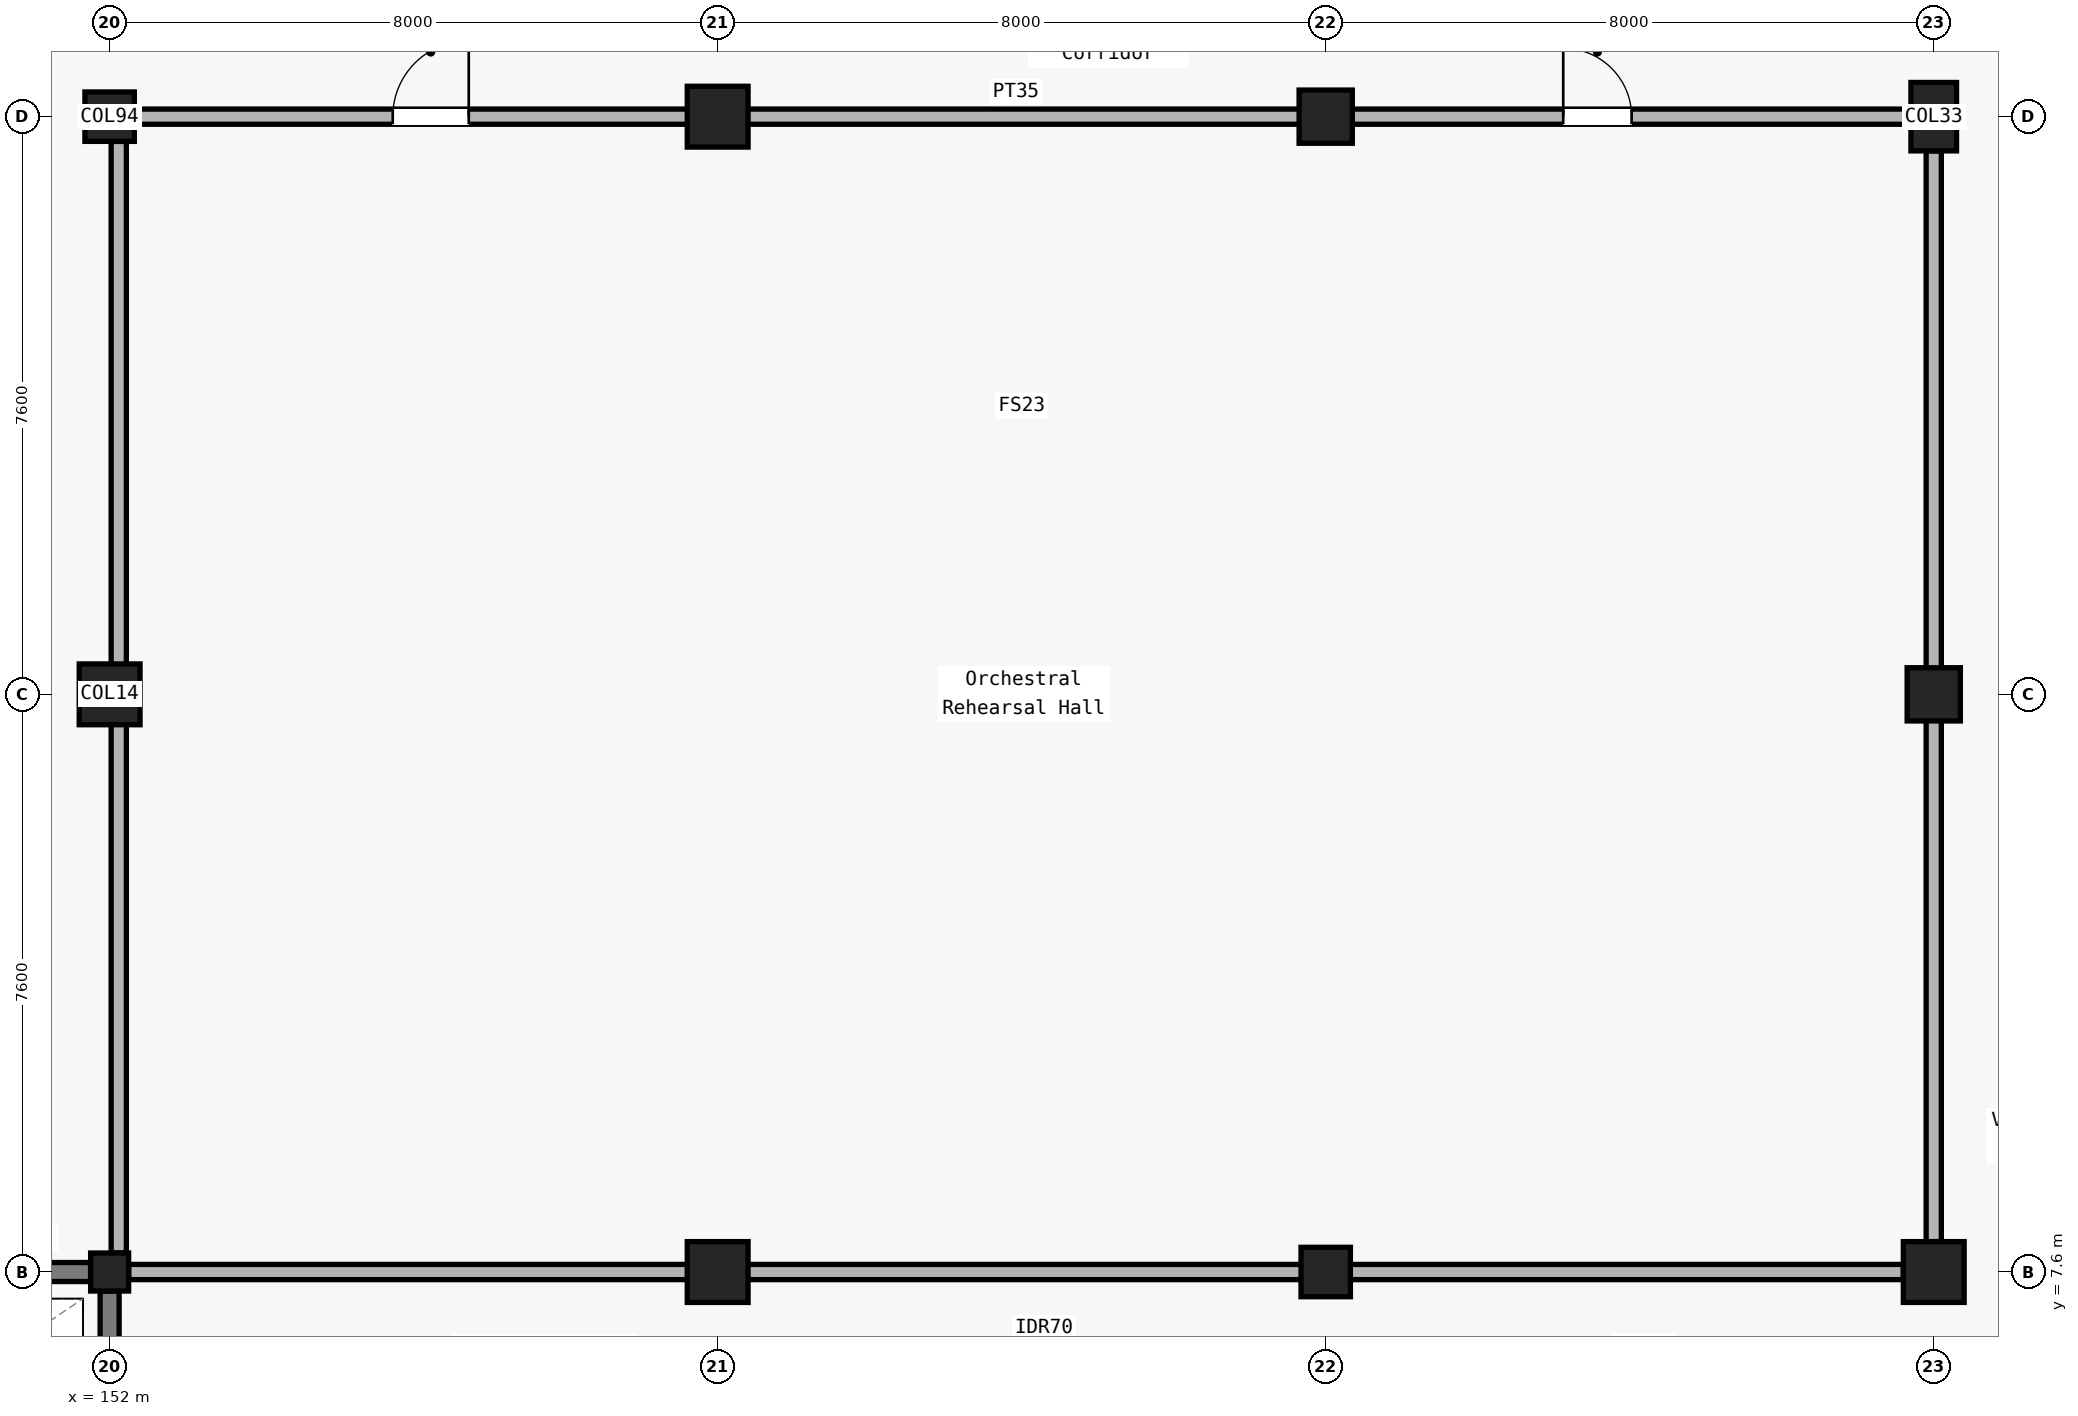
"""IFC4 building model, lengths in metres.
Left out: names, types, materials, properties, quantities, classifications, styles, units other than length and angle.
Written with IfcOpenShell. Run it as: python <this file> out.ifc"""

import sys

from ifc_helpers import new_model, si_unit, direction, frame, frame_2d, origin, origin_2d, place, context, subcontext, project, spatial, rectangle, circle, extrude, element, fill, save


model = new_model("IFC4")
c1 = context("Model", 3, precision=1e-05, world=origin(), true_north=direction((0.0, 1.0)))
c2 = subcontext(c1, "Body", "Model", "MODEL_VIEW")
j1 = project(units=[si_unit("LENGTHUNIT", "METRE"), si_unit("PLANEANGLEUNIT", "RADIAN")], contexts=[c1])
p1 = place(None, origin())
s1 = spatial("IfcSite", under=j1, at=p1, CompositionType="ELEMENT")
p2 = place(p1, origin())
s2 = spatial("IfcBuilding", under=s1, at=p2, CompositionType="ELEMENT")
p3 = place(p2, frame((0.0, 0.0, 10.2)))
s3 = spatial("IfcBuildingStorey", under=s2, at=p3, CompositionType="ELEMENT", Elevation=10.2)
p4 = place(p3, frame((152.0, 7.6, 0.0), z_axis=(0.0, 0.0, 1.0), x_axis=(1.0, 0.0, 0.0)))
e1 = element("IfcColumn", 1, at=p4, inside=s3, PredefinedType="COLUMN", context=c2, shape_type="SweptSolid", body=[
    extrude(rectangle(XDim=0.5, YDim=0.5, at=origin_2d()), origin(), (0.0, 0.0, 1.0), 4.8),
])
p5 = place(p3, frame((152.0, 15.2, 0.0), z_axis=(0.0, 0.0, 1.0), x_axis=(1.0, 0.0, 0.0)))
e2 = element("IfcColumn", 2, at=p5, inside=s3, PredefinedType="COLUMN", context=c2, shape_type="SweptSolid", body=[
    extrude(circle(Radius=0.4, at=origin_2d()), origin(), (0.0, 0.0, 1.0), 4.8),
])
p6 = place(p3, frame((152.0, 22.8, 0.0), z_axis=(0.0, 0.0, 1.0), x_axis=(1.0, 0.0, 0.0)))
e3 = element("IfcColumn", 3, at=p6, inside=s3, PredefinedType="COLUMN", context=c2, shape_type="SweptSolid", body=[
    extrude(circle(Radius=0.325, at=origin_2d()), origin(), (0.0, 0.0, 1.0), 4.8),
])
p7 = place(p3, frame((160.0, 7.6, 0.0), z_axis=(0.0, 0.0, 1.0), x_axis=(1.0, 0.0, 0.0)))
e4 = element("IfcColumn", 4, at=p7, inside=s3, PredefinedType="COLUMN", context=c2, shape_type="SweptSolid", body=[
    extrude(circle(Radius=0.4, at=origin_2d()), origin(), (0.0, 0.0, 1.0), 4.8),
])
p8 = place(p3, frame((160.0, 22.8, 0.0), z_axis=(0.0, 0.0, 1.0), x_axis=(1.0, 0.0, 0.0)))
e5 = element("IfcColumn", 5, at=p8, inside=s3, PredefinedType="COLUMN", context=c2, shape_type="SweptSolid", body=[
    extrude(rectangle(XDim=0.8, YDim=0.8, at=origin_2d()), origin(), (0.0, 0.0, 1.0), 4.8),
])
p9 = place(p3, frame((168.0, 7.6, 0.0), z_axis=(0.0, 0.0, 1.0), x_axis=(1.0, 0.0, 0.0)))
e6 = element("IfcColumn", 6, at=p9, inside=s3, PredefinedType="COLUMN", context=c2, shape_type="SweptSolid", body=[
    extrude(circle(Radius=0.325, at=origin_2d()), origin(), (0.0, 0.0, 1.0), 4.8),
])
p10 = place(p3, frame((168.0, 22.8, 0.0), z_axis=(0.0, 0.0, 1.0), x_axis=(1.0, 0.0, 0.0)))
e7 = element("IfcColumn", 7, at=p10, inside=s3, PredefinedType="COLUMN", context=c2, shape_type="SweptSolid", body=[
    extrude(rectangle(XDim=0.7, YDim=0.7, at=origin_2d()), origin(), (0.0, 0.0, 1.0), 4.8),
])
p11 = place(p3, frame((176.0, 7.6, 0.0), z_axis=(0.0, 0.0, 1.0), x_axis=(1.0, 0.0, 0.0)))
e8 = element("IfcColumn", 8, at=p11, inside=s3, PredefinedType="COLUMN", context=c2, shape_type="SweptSolid", body=[
    extrude(rectangle(XDim=0.8, YDim=0.8, at=origin_2d()), origin(), (0.0, 0.0, 1.0), 4.8),
])
p12 = place(p3, frame((176.0, 15.2, 0.0), z_axis=(0.0, 0.0, 1.0), x_axis=(1.0, 0.0, 0.0)))
e9 = element("IfcColumn", 9, at=p12, inside=s3, PredefinedType="COLUMN", context=c2, shape_type="SweptSolid", body=[
    extrude(rectangle(XDim=0.7, YDim=0.7, at=origin_2d()), origin(), (0.0, 0.0, 1.0), 4.8),
])
p13 = place(p3, frame((176.0, 22.8, 0.0), z_axis=(0.0, 0.0, 1.0), x_axis=(1.0, 0.0, 0.0)))
e10 = element("IfcColumn", 10, at=p13, inside=s3, PredefinedType="COLUMN", context=c2, shape_type="SweptSolid", body=[
    extrude(rectangle(XDim=0.6, YDim=0.9, at=origin_2d()), origin(), (0.0, 0.0, 1.0), 4.8),
])
p14 = place(p3, frame((144.15, 7.6, 0.0), z_axis=(0.0, 0.0, 1.0), x_axis=(1.0, 0.0, 0.0)))
e11 = element("IfcWall", 11, at=p14, inside=s3, PredefinedType="SOLIDWALL", context=c2, shape_type="SweptSolid", body=[
    extrude(rectangle(XDim=7.6, YDim=0.25, at=frame_2d((3.8, 0.0))), origin(), (0.0, 0.0, 1.0), 3.655),
])
p15 = place(p3, frame((152.0, 0.195, 0.0), z_axis=(0.0, 0.0, 1.0), x_axis=(0.0, 1.0, 0.0)))
e12 = element("IfcWall", 12, at=p15, inside=s3, PredefinedType="SOLIDWALL", context=c2, shape_type="SweptSolid", body=[
    extrude(rectangle(XDim=7.155, YDim=0.25, at=frame_2d((3.578, 0.0))), origin(), (0.0, 0.0, 1.0), 3.745),
])
p16 = place(p15, frame((2.155, 0.0, 0.0)))
e13 = element("IfcOpeningElement", 13, at=p16, cuts=e12, PredefinedType="OPENING", context=c2, shape_type="SweptSolid", body=[
    extrude(rectangle(XDim=1.35, YDim=2.2, at=frame_2d((0.675, 1.1))), frame((0.0, 0.135, 0.0), z_axis=(0.0, -1.0, 0.0), x_axis=(1.0, 0.0, 0.0)), (0.0, 0.0, 1.0), 0.27),
])
p17 = place(p3, frame((152.325, 22.8, 0.0), z_axis=(0.0, 0.0, 1.0), x_axis=(1.0, 0.0, 0.0)))
e14 = element("IfcWall", 14, at=p17, inside=s3, PredefinedType="PARTITIONING", context=c2, shape_type="SweptSolid", body=[
    extrude(rectangle(XDim=23.375, YDim=0.2, at=frame_2d((11.688, 0.0))), origin(), (0.0, 0.0, 1.0), 3.56),
])
p18 = place(p17, frame((3.4, 0.0, 0.0)))
e15 = element("IfcOpeningElement", 15, at=p18, cuts=e14, PredefinedType="OPENING", context=c2, shape_type="SweptSolid", body=[
    extrude(rectangle(XDim=1.0, YDim=2.05, at=frame_2d((0.5, 1.025))), frame((0.0, 0.11, 0.0), z_axis=(0.0, -1.0, 0.0), x_axis=(1.0, 0.0, 0.0)), (0.0, 0.0, 1.0), 0.22),
])
p19 = place(p17, frame((18.8, 0.0, 0.0)))
e16 = element("IfcOpeningElement", 16, at=p19, cuts=e14, PredefinedType="OPENING", context=c2, shape_type="SweptSolid", body=[
    extrude(rectangle(XDim=0.9, YDim=2.1, at=frame_2d((0.45, 1.05))), frame((0.0, 0.11, 0.0), z_axis=(0.0, -1.0, 0.0), x_axis=(1.0, 0.0, 0.0)), (0.0, 0.0, 1.0), 0.22),
])
p20 = place(p3, frame((152.12, 7.85, 0.0), z_axis=(0.0, 0.0, 1.0), x_axis=(0.0, 1.0, 0.0)))
e17 = element("IfcWall", 17, at=p20, inside=s3, PredefinedType="PARTITIONING", context=c2, shape_type="SweptSolid", body=[
    extrude(rectangle(XDim=14.625, YDim=0.2, at=frame_2d((7.312, 0.0))), origin(), (0.0, 0.0, 1.0), 3.56),
])
p21 = place(p3, frame((176.0, 8.0, 0.0), z_axis=(0.0, 0.0, 1.0), x_axis=(0.0, 1.0, 0.0)))
e18 = element("IfcWall", 18, at=p21, inside=s3, PredefinedType="PARTITIONING", context=c2, shape_type="SweptSolid", body=[
    extrude(rectangle(XDim=14.35, YDim=0.2, at=frame_2d((7.175, 0.0))), origin(), (0.0, 0.0, 1.0), 3.56),
])
p22 = place(p3, frame((152.25, 7.6, 0.0), z_axis=(0.0, 0.0, 1.0), x_axis=(1.0, 0.0, 0.0)))
e19 = element("IfcWall", 19, at=p22, inside=s3, PredefinedType="PARTITIONING", context=c2, shape_type="SweptSolid", body=[
    extrude(rectangle(XDim=23.35, YDim=0.2, at=frame_2d((11.675, 0.0))), origin(), (0.0, 0.0, 1.0), 3.56),
])
p23 = place(p18, origin())
e20 = element("IfcDoor", 20, at=p23, inside=s3, OperationType="SINGLE_SWING_RIGHT", PredefinedType="DOOR", context=c2, shape_type="SweptSolid", body=[
    extrude(rectangle(XDim=1.0, YDim=2.05, at=frame_2d((0.5, 1.025))), frame((0.0, 0.025, 0.0), z_axis=(0.0, -1.0, 0.0), x_axis=(1.0, 0.0, 0.0)), (0.0, 0.0, 1.0), 0.05),
])
fill(e15, e20)
p24 = place(p19, origin())
e21 = element("IfcDoor", 21, at=p24, inside=s3, OperationType="SINGLE_SWING_LEFT", PredefinedType="DOOR", context=c2, shape_type="SweptSolid", body=[
    extrude(rectangle(XDim=0.9, YDim=2.1, at=frame_2d((0.45, 1.05))), frame((0.0, 0.025, 0.0), z_axis=(0.0, -1.0, 0.0), x_axis=(1.0, 0.0, 0.0)), (0.0, 0.0, 1.0), 0.05),
])
fill(e16, e21)
save(model, sys.argv[1])
